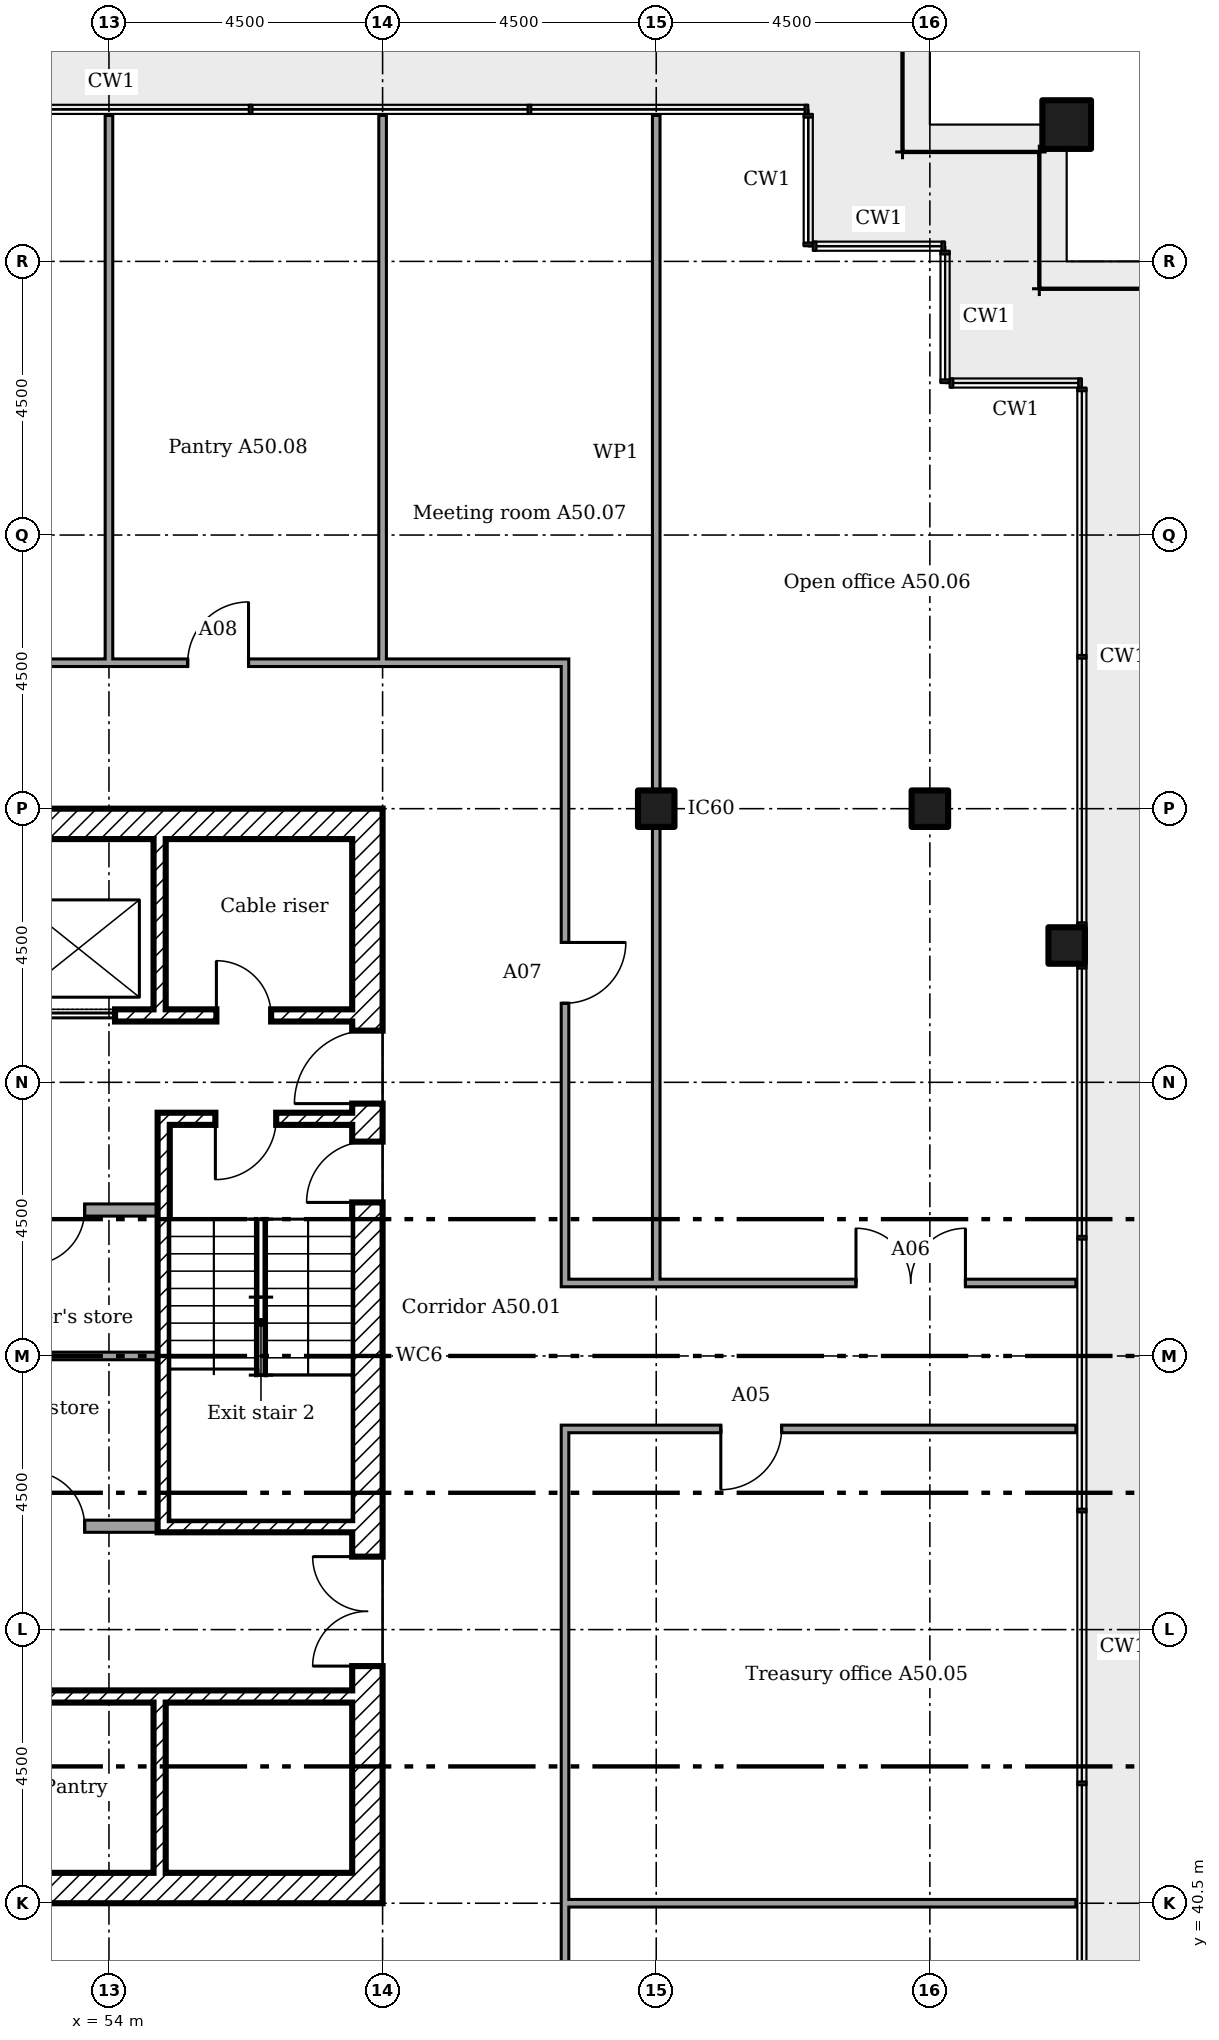
"""IFC4 building model, lengths in metres.
Left out: names, types, materials, properties, quantities, classifications, styles, units other than length and angle.
Written with IfcOpenShell. Run it as: python <this file> out.ifc"""

import sys

from ifc_helpers import new_model, si_unit, direction, frame, frame_2d, origin, origin_2d, place, context, subcontext, project, spatial, rectangle, extrude, element, fill, save


model = new_model("IFC4")
c1 = context("Model", 3, precision=1e-05, world=origin(), true_north=direction((0.0, 1.0)))
c2 = subcontext(c1, "Body", "Model", "MODEL_VIEW")
j1 = project(units=[si_unit("LENGTHUNIT", "METRE"), si_unit("PLANEANGLEUNIT", "RADIAN")], contexts=[c1])
p1 = place(None, origin())
s1 = spatial("IfcSite", under=j1, at=p1, CompositionType="ELEMENT")
p2 = place(p1, origin())
s2 = spatial("IfcBuilding", under=s1, at=p2, CompositionType="ELEMENT")
p3 = place(p2, frame((0.0, 0.0, 199.2)))
s3 = spatial("IfcBuildingStorey", under=s2, at=p3, CompositionType="ELEMENT", Elevation=199.2)
p4 = place(p3, frame((69.75, 69.75, 0.0)))
e1 = element("IfcColumn", 1, at=p4, inside=s3, PredefinedType="COLUMN", context=c2, shape_type="SweptSolid", body=[
    extrude(rectangle(XDim=0.8, YDim=0.8, at=origin_2d()), origin(), (0.0, 0.0, 1.0), 3.6),
])
for number, where in (
    (2, (63.0, 58.5, 0.0)),
    (3, (67.5, 58.5, 0.0)),
    (4, (69.75, 56.25, 0.0)),
):
    element("IfcColumn", number, at=place(p3, frame(where)), inside=s3, PredefinedType="COLUMN", context=c2, shape_type="SweptSolid", body=[
        extrude(rectangle(XDim=0.6, YDim=0.6, at=origin_2d()), origin(), (0.0, 0.0, 1.0), 3.6),
    ])
p5 = place(p3, frame((58.25, 40.5, 0.0), z_axis=(0.0, 0.0, 1.0), x_axis=(0.0, 1.0, 0.0)))
e5 = element("IfcWall", 5, at=p5, inside=s3, PredefinedType="SHEAR", context=c2, shape_type="SweptSolid", body=[
    extrude(rectangle(XDim=18.0, YDim=0.5, at=frame_2d((9.0, 0.0))), origin(), (0.0, 0.0, 1.0), 3.35),
])
p6 = place(p5, frame((13.15, 0.0, 0.0)))
e6 = element("IfcOpeningElement", 6, at=p6, cuts=e5, PredefinedType="OPENING", context=c2, shape_type="SweptSolid", body=[
    extrude(rectangle(XDim=1.2, YDim=2.1, at=frame_2d((0.6, 1.05))), frame((0.0, 0.26, 0.0), z_axis=(0.0, -1.0, 0.0), x_axis=(1.0, 0.0, 0.0)), (0.0, 0.0, 1.0), 0.52),
])
p7 = place(p5, frame((3.9, 0.0, 0.0)))
e7 = element("IfcOpeningElement", 7, at=p7, cuts=e5, PredefinedType="OPENING", context=c2, shape_type="SweptSolid", body=[
    extrude(rectangle(XDim=1.8, YDim=2.1, at=frame_2d((0.9, 1.05))), frame((0.0, 0.26, 0.0), z_axis=(0.0, -1.0, 0.0), x_axis=(1.0, 0.0, 0.0)), (0.0, 0.0, 1.0), 0.52),
])
p8 = place(p5, frame((11.525, 0.0, 0.0)))
e8 = element("IfcOpeningElement", 8, at=p8, cuts=e5, PredefinedType="OPENING", context=c2, shape_type="SweptSolid", body=[
    extrude(rectangle(XDim=1.0, YDim=2.1, at=frame_2d((0.5, 1.05))), frame((0.0, 0.26, 0.0), z_axis=(0.0, -1.0, 0.0), x_axis=(1.0, 0.0, 0.0)), (0.0, 0.0, 1.0), 0.52),
])
for number, where in (
    (9, (40.5, 58.25, 0.0)),
    (10, (40.5, 40.75, 0.0)),
):
    element("IfcWall", number, at=place(p3, frame(where)), inside=s3, PredefinedType="SHEAR", context=c2, shape_type="SweptSolid", body=[
        extrude(rectangle(XDim=17.5, YDim=0.5, at=frame_2d((8.75, 0.0))), origin(), (0.0, 0.0, 1.0), 3.35),
    ])
for number, where, z_axis, x_axis in (
    (11, (54.833, 58.0, 0.0), (0.0, 0.0, 1.0), (0.0, -1.0, 0.0)),
    (12, (54.833, 41.0, 0.0), (0.0, 0.0, 1.0), (0.0, 1.0, 0.0)),
):
    element("IfcWall", number, at=place(p3, frame(where, z_axis=z_axis, x_axis=x_axis)), inside=s3, PredefinedType="SHEAR", context=c2, shape_type="SweptSolid", body=[
        extrude(rectangle(XDim=2.8, YDim=0.2, at=frame_2d((1.4, 0.0))), origin(), (0.0, 0.0, 1.0), 3.35),
    ])
p9 = place(p3, frame((46.933, 55.1, 0.0)))
e13 = element("IfcWall", 13, at=p9, inside=s3, PredefinedType="SHEAR", context=c2, shape_type="SweptSolid", body=[
    extrude(rectangle(XDim=11.067, YDim=0.2, at=frame_2d((5.533, 0.0))), origin(), (0.0, 0.0, 1.0), 3.35),
])
p10 = place(p9, frame((8.833, 0.0, 0.0)))
e14 = element("IfcOpeningElement", 14, at=p10, cuts=e13, PredefinedType="OPENING", context=c2, shape_type="SweptSolid", body=[
    extrude(rectangle(XDim=0.9, YDim=2.1, at=frame_2d((0.45, 1.05))), frame((0.0, 0.11, 0.0), z_axis=(0.0, -1.0, 0.0), x_axis=(1.0, 0.0, 0.0)), (0.0, 0.0, 1.0), 0.22),
])
p11 = place(p9, frame((0.633, 0.0, 0.0)))
e15 = element("IfcOpeningElement", 15, at=p11, cuts=e13, PredefinedType="OPENING", context=c2, shape_type="SweptSolid", body=[
    extrude(rectangle(XDim=1.2, YDim=2.1, at=frame_2d((0.6, 1.05))), frame((0.0, 0.11, 0.0), z_axis=(0.0, -1.0, 0.0), x_axis=(1.0, 0.0, 0.0)), (0.0, 0.0, 1.0), 0.22),
])
p12 = place(p9, frame((3.3, 0.0, 0.0)))
e16 = element("IfcOpeningElement", 16, at=p12, cuts=e13, PredefinedType="OPENING", context=c2, shape_type="SweptSolid", body=[
    extrude(rectangle(XDim=1.2, YDim=2.1, at=frame_2d((0.6, 1.05))), frame((0.0, 0.11, 0.0), z_axis=(0.0, -1.0, 0.0), x_axis=(1.0, 0.0, 0.0)), (0.0, 0.0, 1.0), 0.22),
])
p13 = place(p9, frame((5.967, 0.0, 0.0)))
e17 = element("IfcOpeningElement", 17, at=p13, cuts=e13, PredefinedType="OPENING", context=c2, shape_type="SweptSolid", body=[
    extrude(rectangle(XDim=1.2, YDim=2.1, at=frame_2d((0.6, 1.05))), frame((0.0, 0.11, 0.0), z_axis=(0.0, -1.0, 0.0), x_axis=(1.0, 0.0, 0.0)), (0.0, 0.0, 1.0), 0.22),
])
p14 = place(p3, frame((41.0, 43.9, 0.0)))
e18 = element("IfcWall", 18, at=p14, inside=s3, PredefinedType="SHEAR", context=c2, shape_type="SweptSolid", body=[
    extrude(rectangle(XDim=17.0, YDim=0.2, at=frame_2d((8.5, 0.0))), origin(), (0.0, 0.0, 1.0), 3.35),
])
p15 = place(p14, frame((4.05, 0.0, 0.0)))
e19 = element("IfcOpeningElement", 19, at=p15, cuts=e18, PredefinedType="OPENING", context=c2, shape_type="SweptSolid", body=[
    extrude(rectangle(XDim=0.9, YDim=2.1, at=frame_2d((0.45, 1.05))), frame((0.0, 0.11, 0.0), z_axis=(0.0, -1.0, 0.0), x_axis=(1.0, 0.0, 0.0)), (0.0, 0.0, 1.0), 0.22),
])
p16 = place(p14, frame((10.717, 0.0, 0.0)))
e20 = element("IfcOpeningElement", 20, at=p16, cuts=e18, PredefinedType="OPENING", context=c2, shape_type="SweptSolid", body=[
    extrude(rectangle(XDim=0.9, YDim=2.1, at=frame_2d((0.45, 1.05))), frame((0.0, 0.11, 0.0), z_axis=(0.0, -1.0, 0.0), x_axis=(1.0, 0.0, 0.0)), (0.0, 0.0, 1.0), 0.22),
])
p17 = place(p3, frame((54.8, 53.4, 0.0)))
e21 = element("IfcWall", 21, at=p17, inside=s3, PredefinedType="SHEAR", context=c2, shape_type="SweptSolid", body=[
    extrude(rectangle(XDim=3.2, YDim=0.2, at=frame_2d((1.6, 0.0))), origin(), (0.0, 0.0, 1.0), 3.35),
])
p18 = place(p17, frame((0.95, 0.0, 0.0)))
e22 = element("IfcOpeningElement", 22, at=p18, cuts=e21, PredefinedType="OPENING", context=c2, shape_type="SweptSolid", body=[
    extrude(rectangle(XDim=1.0, YDim=2.1, at=frame_2d((0.5, 1.05))), frame((0.0, 0.11, 0.0), z_axis=(0.0, -1.0, 0.0), x_axis=(1.0, 0.0, 0.0)), (0.0, 0.0, 1.0), 0.22),
])
p19 = place(p3, frame((54.8, 46.7, 0.0)))
e23 = element("IfcWall", 23, at=p19, inside=s3, PredefinedType="SHEAR", context=c2, shape_type="SweptSolid", body=[
    extrude(rectangle(XDim=3.2, YDim=0.2, at=frame_2d((1.6, 0.0))), origin(), (0.0, 0.0, 1.0), 3.35),
])
p20 = place(p3, frame((54.9, 46.8, 0.0), z_axis=(0.0, 0.0, 1.0), x_axis=(0.0, 1.0, 0.0)))
e24 = element("IfcWall", 24, at=p20, inside=s3, PredefinedType="SHEAR", context=c2, shape_type="SweptSolid", body=[
    extrude(rectangle(XDim=6.5, YDim=0.2, at=frame_2d((3.25, 0.0))), origin(), (0.0, 0.0, 1.0), 3.35),
])
p21 = place(p3, frame((44.2, 51.9, 0.0)))
e25 = element("IfcWall", 25, at=p21, inside=s3, PredefinedType="PARTITIONING", context=c2, shape_type="SweptSolid", body=[
    extrude(rectangle(XDim=10.6, YDim=0.2, at=frame_2d((5.3, 0.0))), origin(), (0.0, 0.0, 1.0), 3.35),
])
p22 = place(p21, frame((8.5, 0.0, 0.0)))
e26 = element("IfcOpeningElement", 26, at=p22, cuts=e25, PredefinedType="OPENING", context=c2, shape_type="SweptSolid", body=[
    extrude(rectangle(XDim=0.9, YDim=2.1, at=frame_2d((0.45, 1.05))), frame((0.0, 0.11, 0.0), z_axis=(0.0, -1.0, 0.0), x_axis=(1.0, 0.0, 0.0)), (0.0, 0.0, 1.0), 0.22),
])
p23 = place(p3, frame((44.2, 46.7, 0.0)))
e27 = element("IfcWall", 27, at=p23, inside=s3, PredefinedType="PARTITIONING", context=c2, shape_type="SweptSolid", body=[
    extrude(rectangle(XDim=10.6, YDim=0.2, at=frame_2d((5.3, 0.0))), origin(), (0.0, 0.0, 1.0), 3.35),
])
p24 = place(p23, frame((2.0, 0.0, 0.0)))
e28 = element("IfcOpeningElement", 28, at=p24, cuts=e27, PredefinedType="OPENING", context=c2, shape_type="SweptSolid", body=[
    extrude(rectangle(XDim=0.9, YDim=2.1, at=frame_2d((0.45, 1.05))), frame((0.0, 0.11, 0.0), z_axis=(0.0, -1.0, 0.0), x_axis=(1.0, 0.0, 0.0)), (0.0, 0.0, 1.0), 0.22),
])
p25 = place(p23, frame((5.65, 0.0, 0.0)))
e29 = element("IfcOpeningElement", 29, at=p25, cuts=e27, PredefinedType="OPENING", context=c2, shape_type="SweptSolid", body=[
    extrude(rectangle(XDim=0.9, YDim=2.1, at=frame_2d((0.45, 1.05))), frame((0.0, 0.11, 0.0), z_axis=(0.0, -1.0, 0.0), x_axis=(1.0, 0.0, 0.0)), (0.0, 0.0, 1.0), 0.22),
])
p26 = place(p23, frame((8.5, 0.0, 0.0)))
e30 = element("IfcOpeningElement", 30, at=p26, cuts=e27, PredefinedType="OPENING", context=c2, shape_type="SweptSolid", body=[
    extrude(rectangle(XDim=0.9, YDim=2.1, at=frame_2d((0.45, 1.05))), frame((0.0, 0.11, 0.0), z_axis=(0.0, -1.0, 0.0), x_axis=(1.0, 0.0, 0.0)), (0.0, 0.0, 1.0), 0.22),
])
p27 = place(p3, frame((51.562, 49.5, 0.0)))
e31 = element("IfcWall", 31, at=p27, inside=s3, PredefinedType="PARTITIONING", context=c2, shape_type="SweptSolid", body=[
    extrude(rectangle(XDim=3.238, YDim=0.125, at=frame_2d((1.619, 0.0))), origin(), (0.0, 0.0, 1.0), 3.35),
])
p28 = place(p3, frame((61.5, 40.5, 0.0)))
e32 = element("IfcWall", 32, at=p28, inside=s3, PredefinedType="PARTITIONING", context=c2, shape_type="SweptSolid", body=[
    extrude(rectangle(XDim=8.4, YDim=0.125, at=frame_2d((4.2, 0.0))), origin(), (0.0, 0.0, 1.0), 2.772),
])
p29 = place(p3, frame((61.438, 48.3, 0.0)))
e33 = element("IfcWall", 33, at=p29, inside=s3, PredefinedType="PARTITIONING", context=c2, shape_type="SweptSolid", body=[
    extrude(rectangle(XDim=8.462, YDim=0.125, at=frame_2d((4.231, 0.0))), origin(), (0.0, 0.0, 1.0), 3.45),
])
p30 = place(p29, frame((2.625, 0.0, 0.0)))
e34 = element("IfcOpeningElement", 34, at=p30, cuts=e33, PredefinedType="OPENING", context=c2, shape_type="SweptSolid", body=[
    extrude(rectangle(XDim=1.0, YDim=2.1, at=frame_2d((0.5, 1.05))), frame((0.0, 0.073, 0.0), z_axis=(0.0, -1.0, 0.0), x_axis=(1.0, 0.0, 0.0)), (0.0, 0.0, 1.0), 0.145),
])
p31 = place(p3, frame((61.438, 50.7, 0.0)))
e35 = element("IfcWall", 35, at=p31, inside=s3, PredefinedType="PARTITIONING", context=c2, shape_type="SweptSolid", body=[
    extrude(rectangle(XDim=8.462, YDim=0.125, at=frame_2d((4.231, 0.0))), origin(), (0.0, 0.0, 1.0), 3.45),
])
p32 = place(p31, frame((4.847, 0.0, 0.0)))
e36 = element("IfcOpeningElement", 36, at=p32, cuts=e35, PredefinedType="OPENING", context=c2, shape_type="SweptSolid", body=[
    extrude(rectangle(XDim=1.8, YDim=2.1, at=frame_2d((0.9, 1.05))), frame((0.0, 0.073, 0.0), z_axis=(0.0, -1.0, 0.0), x_axis=(1.0, 0.0, 0.0)), (0.0, 0.0, 1.0), 0.145),
])
p33 = place(p3, frame((42.6, 60.9, 0.0)))
e37 = element("IfcWall", 37, at=p33, inside=s3, PredefinedType="PARTITIONING", context=c2, shape_type="SweptSolid", body=[
    extrude(rectangle(XDim=18.962, YDim=0.125, at=frame_2d((9.481, 0.0))), origin(), (0.0, 0.0, 1.0), 3.45),
])
p34 = place(p33, frame((12.695, 0.0, 0.0)))
e38 = element("IfcOpeningElement", 38, at=p34, cuts=e37, PredefinedType="OPENING", context=c2, shape_type="SweptSolid", body=[
    extrude(rectangle(XDim=1.0, YDim=2.1, at=frame_2d((0.5, 1.05))), frame((0.0, 0.073, 0.0), z_axis=(0.0, -1.0, 0.0), x_axis=(1.0, 0.0, 0.0)), (0.0, 0.0, 1.0), 0.145),
])
p35 = place(p33, frame((6.322, 0.0, 0.0)))
e39 = element("IfcOpeningElement", 39, at=p35, cuts=e37, PredefinedType="OPENING", context=c2, shape_type="SweptSolid", body=[
    extrude(rectangle(XDim=1.8, YDim=2.1, at=frame_2d((0.9, 1.05))), frame((0.0, 0.073, 0.0), z_axis=(0.0, -1.0, 0.0), x_axis=(1.0, 0.0, 0.0)), (0.0, 0.0, 1.0), 0.145),
])
for number, where, z_axis, x_axis in (
    (40, (54.0, 60.9, 0.0), (0.0, 0.0, 1.0), (0.0, 1.0, 0.0)),
    (41, (58.5, 60.9, 0.0), (0.0, 0.0, 1.0), (0.0, 1.0, 0.0)),
):
    element("IfcWall", number, at=place(p3, frame(where, z_axis=z_axis, x_axis=x_axis)), inside=s3, PredefinedType="PARTITIONING", context=c2, shape_type="SweptSolid", body=[
        extrude(rectangle(XDim=9.0, YDim=0.125, at=frame_2d((4.5, 0.0))), origin(), (0.0, 0.0, 1.0), 2.772),
    ])
p36 = place(p3, frame((61.5, 38.462, 0.0), z_axis=(0.0, 0.0, 1.0), x_axis=(0.0, 1.0, 0.0)))
e42 = element("IfcWall", 42, at=p36, inside=s3, PredefinedType="PARTITIONING", context=c2, shape_type="SweptSolid", body=[
    extrude(rectangle(XDim=9.775, YDim=0.125, at=frame_2d((4.888, 0.0))), origin(), (0.0, 0.0, 1.0), 3.45),
])
p37 = place(p3, frame((61.5, 50.762, 0.0), z_axis=(0.0, 0.0, 1.0), x_axis=(0.0, 1.0, 0.0)))
e43 = element("IfcWall", 43, at=p37, inside=s3, PredefinedType="PARTITIONING", context=c2, shape_type="SweptSolid", body=[
    extrude(rectangle(XDim=10.075, YDim=0.125, at=frame_2d((5.038, 0.0))), origin(), (0.0, 0.0, 1.0), 3.45),
])
p38 = place(p37, frame((4.538, 0.0, 0.0)))
e44 = element("IfcOpeningElement", 44, at=p38, cuts=e43, PredefinedType="OPENING", context=c2, shape_type="SweptSolid", body=[
    extrude(rectangle(XDim=1.0, YDim=2.1, at=frame_2d((0.5, 1.05))), frame((0.0, 0.073, 0.0), z_axis=(0.0, -1.0, 0.0), x_axis=(1.0, 0.0, 0.0)), (0.0, 0.0, 1.0), 0.145),
])
p39 = place(p3, frame((63.0, 50.7, 0.0), z_axis=(0.0, 0.0, 1.0), x_axis=(0.0, 1.0, 0.0)))
e45 = element("IfcWall", 45, at=p39, inside=s3, PredefinedType="PARTITIONING", context=c2, shape_type="SweptSolid", body=[
    extrude(rectangle(XDim=7.5, YDim=0.125, at=frame_2d((3.75, 0.0))), origin(), (0.0, 0.0, 1.0), 3.45),
])
p40 = place(p3, frame((63.0, 58.8, 0.0), z_axis=(0.0, 0.0, 1.0), x_axis=(0.0, 1.0, 0.0)))
e46 = element("IfcWall", 46, at=p40, inside=s3, PredefinedType="PARTITIONING", context=c2, shape_type="SweptSolid", body=[
    extrude(rectangle(XDim=11.1, YDim=0.125, at=frame_2d((5.55, 0.0))), origin(), (0.0, 0.0, 1.0), 2.772),
])
p41 = place(p6, origin())
e47 = element("IfcDoor", 47, at=p41, inside=s3, OperationType="SINGLE_SWING_RIGHT", PredefinedType="DOOR", context=c2, shape_type="SweptSolid", body=[
    extrude(rectangle(XDim=1.2, YDim=2.1, at=frame_2d((0.6, 1.05))), frame((0.0, 0.025, 0.0), z_axis=(0.0, -1.0, 0.0), x_axis=(1.0, 0.0, 0.0)), (0.0, 0.0, 1.0), 0.05),
])
fill(e6, e47)
p42 = place(p7, origin())
e48 = element("IfcDoor", 48, at=p42, inside=s3, OperationType="DOUBLE_DOOR_SINGLE_SWING", PredefinedType="DOOR", context=c2, shape_type="SweptSolid", body=[
    extrude(rectangle(XDim=1.8, YDim=2.1, at=frame_2d((0.9, 1.05))), frame((0.0, 0.025, 0.0), z_axis=(0.0, -1.0, 0.0), x_axis=(1.0, 0.0, 0.0)), (0.0, 0.0, 1.0), 0.05),
])
fill(e7, e48)
p43 = place(p18, frame((1.0, 0.0, 0.0), x_axis=(-1.0, 0.0, 0.0)))
e49 = element("IfcDoor", 49, at=p43, inside=s3, OperationType="SINGLE_SWING_LEFT", PredefinedType="DOOR", context=c2, shape_type="SweptSolid", body=[
    extrude(rectangle(XDim=1.0, YDim=2.1, at=frame_2d((0.5, 1.05))), frame((0.0, 0.025, 0.0), z_axis=(0.0, -1.0, 0.0), x_axis=(1.0, 0.0, 0.0)), (0.0, 0.0, 1.0), 0.05),
])
fill(e22, e49)
p44 = place(p8, origin())
e50 = element("IfcDoor", 50, at=p44, inside=s3, OperationType="SINGLE_SWING_RIGHT", PredefinedType="DOOR", context=c2, shape_type="SweptSolid", body=[
    extrude(rectangle(XDim=1.0, YDim=2.1, at=frame_2d((0.5, 1.05))), frame((0.0, 0.025, 0.0), z_axis=(0.0, -1.0, 0.0), x_axis=(1.0, 0.0, 0.0)), (0.0, 0.0, 1.0), 0.05),
])
fill(e8, e50)
p45 = place(p10, origin())
e51 = element("IfcDoor", 51, at=p45, inside=s3, OperationType="SINGLE_SWING_RIGHT", PredefinedType="DOOR", context=c2, shape_type="SweptSolid", body=[
    extrude(rectangle(XDim=0.9, YDim=2.1, at=frame_2d((0.45, 1.05))), frame((0.0, 0.025, 0.0), z_axis=(0.0, -1.0, 0.0), x_axis=(1.0, 0.0, 0.0)), (0.0, 0.0, 1.0), 0.05),
])
fill(e14, e51)
p46 = place(p22, frame((0.9, 0.0, 0.0), x_axis=(-1.0, 0.0, 0.0)))
e52 = element("IfcDoor", 52, at=p46, inside=s3, OperationType="SINGLE_SWING_LEFT", PredefinedType="DOOR", context=c2, shape_type="SweptSolid", body=[
    extrude(rectangle(XDim=0.9, YDim=2.1, at=frame_2d((0.45, 1.05))), frame((0.0, 0.025, 0.0), z_axis=(0.0, -1.0, 0.0), x_axis=(1.0, 0.0, 0.0)), (0.0, 0.0, 1.0), 0.05),
])
fill(e26, e52)
p47 = place(p26, origin())
e53 = element("IfcDoor", 53, at=p47, inside=s3, OperationType="SINGLE_SWING_RIGHT", PredefinedType="DOOR", context=c2, shape_type="SweptSolid", body=[
    extrude(rectangle(XDim=0.9, YDim=2.1, at=frame_2d((0.45, 1.05))), frame((0.0, 0.025, 0.0), z_axis=(0.0, -1.0, 0.0), x_axis=(1.0, 0.0, 0.0)), (0.0, 0.0, 1.0), 0.05),
])
fill(e30, e53)
p48 = place(p13, origin())
e54 = element("IfcDoor", 54, at=p48, inside=s3, OperationType="SLIDING_TO_LEFT", PredefinedType="DOOR", context=c2, shape_type="SweptSolid", body=[
    extrude(rectangle(XDim=1.2, YDim=2.1, at=frame_2d((0.6, 1.05))), frame((0.0, 0.025, 0.0), z_axis=(0.0, -1.0, 0.0), x_axis=(1.0, 0.0, 0.0)), (0.0, 0.0, 1.0), 0.05),
])
fill(e17, e54)
p49 = place(p30, frame((1.0, 0.0, 0.0), x_axis=(-1.0, 0.0, 0.0)))
e55 = element("IfcDoor", 55, at=p49, inside=s3, OperationType="SINGLE_SWING_LEFT", PredefinedType="DOOR", context=c2, shape_type="SweptSolid", body=[
    extrude(rectangle(XDim=1.0, YDim=2.1, at=frame_2d((0.5, 1.05))), frame((0.0, 0.025, 0.0), z_axis=(0.0, -1.0, 0.0), x_axis=(1.0, 0.0, 0.0)), (0.0, 0.0, 1.0), 0.05),
])
fill(e34, e55)
p50 = place(p32, origin())
e56 = element("IfcDoor", 56, at=p50, inside=s3, OperationType="DOUBLE_DOOR_SINGLE_SWING", PredefinedType="DOOR", context=c2, shape_type="SweptSolid", body=[
    extrude(rectangle(XDim=1.8, YDim=2.1, at=frame_2d((0.9, 1.05))), frame((0.0, 0.025, 0.0), z_axis=(0.0, -1.0, 0.0), x_axis=(1.0, 0.0, 0.0)), (0.0, 0.0, 1.0), 0.05),
])
fill(e36, e56)
p51 = place(p38, frame((1.0, 0.0, 0.0), x_axis=(-1.0, 0.0, 0.0)))
e57 = element("IfcDoor", 57, at=p51, inside=s3, OperationType="SINGLE_SWING_RIGHT", PredefinedType="DOOR", context=c2, shape_type="SweptSolid", body=[
    extrude(rectangle(XDim=1.0, YDim=2.1, at=frame_2d((0.5, 1.05))), frame((0.0, 0.025, 0.0), z_axis=(0.0, -1.0, 0.0), x_axis=(1.0, 0.0, 0.0)), (0.0, 0.0, 1.0), 0.05),
])
fill(e44, e57)
p52 = place(p34, origin())
e58 = element("IfcDoor", 58, at=p52, inside=s3, OperationType="SINGLE_SWING_LEFT", PredefinedType="DOOR", context=c2, shape_type="SweptSolid", body=[
    extrude(rectangle(XDim=1.0, YDim=2.1, at=frame_2d((0.5, 1.05))), frame((0.0, 0.025, 0.0), z_axis=(0.0, -1.0, 0.0), x_axis=(1.0, 0.0, 0.0)), (0.0, 0.0, 1.0), 0.05),
])
fill(e38, e58)
save(model, sys.argv[1])
